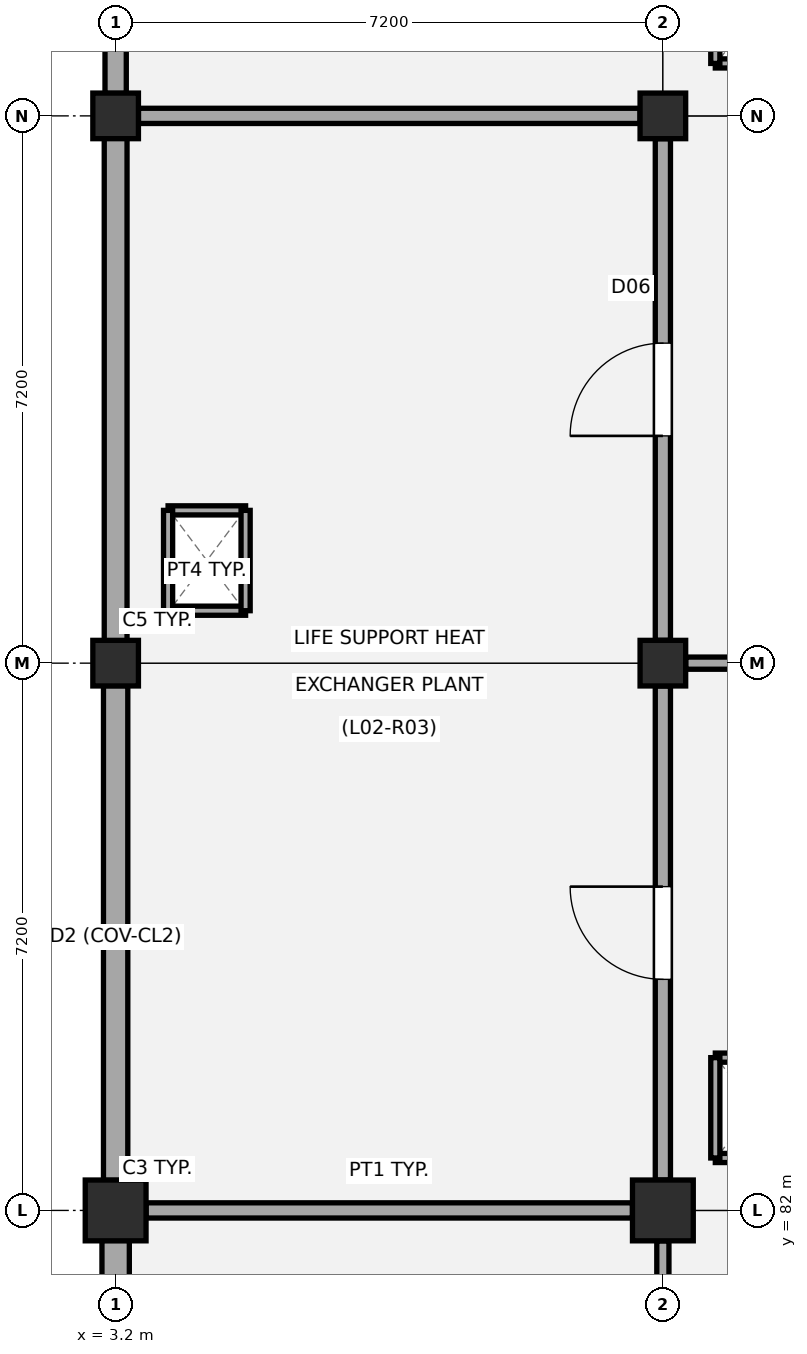
"""IFC4 building model, lengths in metres.
Left out: names, types, materials, properties, quantities, classifications, styles, units other than length and angle.
Written with IfcOpenShell. Run it as: python <this file> out.ifc"""

import sys

from ifc_helpers import new_model, si_unit, direction, frame, frame_2d, origin, origin_2d, place, context, subcontext, project, spatial, rectangle, extrude, element, fill, save


model = new_model("IFC4")
c1 = context("Model", 3, precision=1e-05, world=origin(), true_north=direction((0.0, 1.0)))
c2 = subcontext(c1, "Body", "Model", "MODEL_VIEW")
j1 = project(units=[si_unit("LENGTHUNIT", "METRE"), si_unit("PLANEANGLEUNIT", "RADIAN")], contexts=[c1])
p1 = place(None, origin())
s1 = spatial("IfcSite", under=j1, at=p1, CompositionType="ELEMENT")
p2 = place(p1, origin())
s2 = spatial("IfcBuilding", under=s1, at=p2, CompositionType="ELEMENT")
p3 = place(p2, frame((0.0, 0.0, 9.18)))
s3 = spatial("IfcBuildingStorey", under=s2, at=p3, CompositionType="ELEMENT", Elevation=9.18)
p4 = place(p3, frame((3.2, 82.0, 0.0), z_axis=(0.0, 0.0, 1.0), x_axis=(1.0, 0.0, 0.0)))
e1 = element("IfcColumn", 1, at=p4, inside=s3, PredefinedType="COLUMN", context=c2, shape_type="SweptSolid", body=[
    extrude(rectangle(XDim=0.8, YDim=0.8, at=origin_2d()), origin(), (0.0, 0.0, 1.0), 4.32),
])
for number, where, z_axis, x_axis in (
    (2, (3.2, 89.2, 0.0), (0.0, 0.0, 1.0), (1.0, 0.0, 0.0)),
    (3, (3.2, 96.4, 0.0), (0.0, 0.0, 1.0), (1.0, 0.0, 0.0)),
):
    element("IfcColumn", number, at=place(p3, frame(where, z_axis=z_axis, x_axis=x_axis)), inside=s3, PredefinedType="COLUMN", context=c2, shape_type="SweptSolid", body=[
        extrude(rectangle(XDim=0.6, YDim=0.6, at=origin_2d()), origin(), (0.0, 0.0, 1.0), 4.32),
    ])
p5 = place(p3, frame((10.4, 82.0, 0.0), z_axis=(0.0, 0.0, 1.0), x_axis=(1.0, 0.0, 0.0)))
e4 = element("IfcColumn", 4, at=p5, inside=s3, PredefinedType="COLUMN", context=c2, shape_type="SweptSolid", body=[
    extrude(rectangle(XDim=0.8, YDim=0.8, at=origin_2d()), origin(), (0.0, 0.0, 1.0), 4.32),
])
for number, where, z_axis, x_axis in (
    (5, (10.4, 89.2, 0.0), (0.0, 0.0, 1.0), (1.0, 0.0, 0.0)),
    (6, (10.4, 96.4, 0.0), (0.0, 0.0, 1.0), (1.0, 0.0, 0.0)),
):
    element("IfcColumn", number, at=place(p3, frame(where, z_axis=z_axis, x_axis=x_axis)), inside=s3, PredefinedType="COLUMN", context=c2, shape_type="SweptSolid", body=[
        extrude(rectangle(XDim=0.6, YDim=0.6, at=origin_2d()), origin(), (0.0, 0.0, 1.0), 4.32),
    ])
p6 = place(p3, frame((3.2, 75.195, 0.0), z_axis=(0.0, 0.0, 1.0), x_axis=(0.0, 1.0, 0.0)))
e7 = element("IfcWall", 7, at=p6, inside=s3, PredefinedType="STANDARD", context=c2, shape_type="SweptSolid", body=[
    extrude(rectangle(XDim=6.41, YDim=0.36, at=frame_2d((3.205, 0.0))), origin(), (0.0, 0.0, 1.0), 3.46),
])
p7 = place(p6, frame((2.08, 0.0, 0.95)))
e8 = element("IfcOpeningElement", 8, at=p7, cuts=e7, PredefinedType="OPENING", context=c2, shape_type="SweptSolid", body=[
    extrude(rectangle(XDim=2.25, YDim=1.8, at=frame_2d((1.125, 0.9))), frame((0.0, 0.19, 0.0), z_axis=(0.0, -1.0, 0.0), x_axis=(1.0, 0.0, 0.0)), (0.0, 0.0, 1.0), 0.38),
])
p8 = place(p3, frame((3.2, 82.395, 0.0), z_axis=(0.0, 0.0, 1.0), x_axis=(0.0, 1.0, 0.0)))
e9 = element("IfcWall", 9, at=p8, inside=s3, PredefinedType="STANDARD", context=c2, shape_type="SweptSolid", body=[
    extrude(rectangle(XDim=6.51, YDim=0.32, at=frame_2d((3.255, 0.0))), origin(), (0.0, 0.0, 1.0), 3.48),
])
p9 = place(p3, frame((3.2, 89.495, 0.0), z_axis=(0.0, 0.0, 1.0), x_axis=(0.0, 1.0, 0.0)))
e10 = element("IfcWall", 10, at=p9, inside=s3, PredefinedType="STANDARD", context=c2, shape_type="SweptSolid", body=[
    extrude(rectangle(XDim=6.61, YDim=0.3, at=frame_2d((3.305, 0.0))), origin(), (0.0, 0.0, 1.0), 3.48),
])
p10 = place(p3, frame((3.2, 96.695, 0.0), z_axis=(0.0, 0.0, 1.0), x_axis=(0.0, 1.0, 0.0)))
e11 = element("IfcWall", 11, at=p10, inside=s3, PredefinedType="STANDARD", context=c2, shape_type="SweptSolid", body=[
    extrude(rectangle(XDim=6.61, YDim=0.28, at=frame_2d((3.305, 0.0))), origin(), (0.0, 0.0, 1.0), 3.48),
])
for number, where, z_axis, x_axis in (
    (12, (3.89, 89.89, 0.0), (0.0, 0.0, 1.0), (1.0, 0.0, 0.0)),
    (13, (3.89, 91.21, 0.0), (0.0, 0.0, 1.0), (1.0, 0.0, 0.0)),
):
    element("IfcWall", number, at=place(p3, frame(where, z_axis=z_axis, x_axis=x_axis)), inside=s3, PredefinedType="PARTITIONING", context=c2, shape_type="SweptSolid", body=[
        extrude(rectangle(XDim=1.02, YDim=0.12, at=frame_2d((0.51, 0.0))), origin(), (0.0, 0.0, 1.0), 4.02),
    ])
for number, where, z_axis, x_axis in (
    (14, (3.89, 89.89, 0.0), (0.0, 0.0, 1.0), (0.0, 1.0, 0.0)),
    (15, (4.91, 89.89, 0.0), (0.0, 0.0, 1.0), (0.0, 1.0, 0.0)),
):
    element("IfcWall", number, at=place(p3, frame(where, z_axis=z_axis, x_axis=x_axis)), inside=s3, PredefinedType="PARTITIONING", context=c2, shape_type="SweptSolid", body=[
        extrude(rectangle(XDim=1.32, YDim=0.12, at=frame_2d((0.66, 0.0))), origin(), (0.0, 0.0, 1.0), 4.02),
    ])
for number, where, z_axis, x_axis in (
    (16, (11.09, 82.69, 0.0), (0.0, 0.0, 1.0), (1.0, 0.0, 0.0)),
    (17, (11.09, 84.01, 0.0), (0.0, 0.0, 1.0), (1.0, 0.0, 0.0)),
):
    element("IfcWall", number, at=place(p3, frame(where, z_axis=z_axis, x_axis=x_axis)), inside=s3, PredefinedType="PARTITIONING", context=c2, shape_type="SweptSolid", body=[
        extrude(rectangle(XDim=1.02, YDim=0.12, at=frame_2d((0.51, 0.0))), origin(), (0.0, 0.0, 1.0), 4.02),
    ])
p11 = place(p3, frame((11.09, 82.69, 0.0), z_axis=(0.0, 0.0, 1.0), x_axis=(0.0, 1.0, 0.0)))
e18 = element("IfcWall", 18, at=p11, inside=s3, PredefinedType="PARTITIONING", context=c2, shape_type="SweptSolid", body=[
    extrude(rectangle(XDim=1.32, YDim=0.12, at=frame_2d((0.66, 0.0))), origin(), (0.0, 0.0, 1.0), 4.02),
])
p12 = place(p3, frame((11.09, 97.09, 0.0), z_axis=(0.0, 0.0, 1.0), x_axis=(1.0, 0.0, 0.0)))
e19 = element("IfcWall", 19, at=p12, inside=s3, PredefinedType="PARTITIONING", context=c2, shape_type="SweptSolid", body=[
    extrude(rectangle(XDim=1.02, YDim=0.12, at=frame_2d((0.51, 0.0))), origin(), (0.0, 0.0, 1.0), 4.02),
])
p13 = place(p3, frame((11.09, 97.09, 0.0), z_axis=(0.0, 0.0, 1.0), x_axis=(0.0, 1.0, 0.0)))
e20 = element("IfcWall", 20, at=p13, inside=s3, PredefinedType="PARTITIONING", context=c2, shape_type="SweptSolid", body=[
    extrude(rectangle(XDim=1.32, YDim=0.12, at=frame_2d((0.66, 0.0))), origin(), (0.0, 0.0, 1.0), 4.02),
])
p14 = place(p3, frame((10.4, 75.2, 0.0), z_axis=(0.0, 0.0, 1.0), x_axis=(0.0, 1.0, 0.0)))
e21 = element("IfcWall", 21, at=p14, inside=s3, PredefinedType="PARTITIONING", context=c2, shape_type="SweptSolid", body=[
    extrude(rectangle(XDim=6.4, YDim=0.16, at=frame_2d((3.2, 0.0))), origin(), (0.0, 0.0, 1.0), 3.36),
])
p15 = place(p14, frame((2.48, 0.0, 0.0)))
e22 = element("IfcOpeningElement", 22, at=p15, cuts=e21, PredefinedType="OPENING", context=c2, shape_type="SweptSolid", body=[
    extrude(rectangle(XDim=1.44, YDim=2.2, at=frame_2d((0.72, 1.1))), frame((0.0, 0.09, 0.0), z_axis=(0.0, -1.0, 0.0), x_axis=(1.0, 0.0, 0.0)), (0.0, 0.0, 1.0), 0.18),
])
p16 = place(p3, frame((3.6, 82.0, 0.0), z_axis=(0.0, 0.0, 1.0), x_axis=(1.0, 0.0, 0.0)))
e23 = element("IfcWall", 23, at=p16, inside=s3, PredefinedType="PARTITIONING", context=c2, shape_type="SweptSolid", body=[
    extrude(rectangle(XDim=6.4, YDim=0.2, at=frame_2d((3.2, 0.0))), origin(), (0.0, 0.0, 1.0), 3.41),
])
p17 = place(p3, frame((10.4, 82.4, 0.0), z_axis=(0.0, 0.0, 1.0), x_axis=(0.0, 1.0, 0.0)))
e24 = element("IfcWall", 24, at=p17, inside=s3, PredefinedType="PARTITIONING", context=c2, shape_type="SweptSolid", body=[
    extrude(rectangle(XDim=6.5, YDim=0.2, at=frame_2d((3.25, 0.0))), origin(), (0.0, 0.0, 1.0), 3.43),
])
p18 = place(p17, frame((2.64, 0.0, 0.0)))
e25 = element("IfcOpeningElement", 25, at=p18, cuts=e24, PredefinedType="OPENING", context=c2, shape_type="SweptSolid", body=[
    extrude(rectangle(XDim=1.22, YDim=2.16, at=frame_2d((0.61, 1.08))), frame((0.0, 0.11, 0.0), z_axis=(0.0, -1.0, 0.0), x_axis=(1.0, 0.0, 0.0)), (0.0, 0.0, 1.0), 0.22),
])
p19 = place(p3, frame((10.4, 89.5, 0.0), z_axis=(0.0, 0.0, 1.0), x_axis=(0.0, 1.0, 0.0)))
e26 = element("IfcWall", 26, at=p19, inside=s3, PredefinedType="PARTITIONING", context=c2, shape_type="SweptSolid", body=[
    extrude(rectangle(XDim=6.6, YDim=0.2, at=frame_2d((3.3, 0.0))), origin(), (0.0, 0.0, 1.0), 3.38),
])
p20 = place(p19, frame((2.69, 0.0, 0.0)))
e27 = element("IfcOpeningElement", 27, at=p20, cuts=e26, PredefinedType="OPENING", context=c2, shape_type="SweptSolid", body=[
    extrude(rectangle(XDim=1.22, YDim=2.16, at=frame_2d((0.61, 1.08))), frame((0.0, 0.11, 0.0), z_axis=(0.0, -1.0, 0.0), x_axis=(1.0, 0.0, 0.0)), (0.0, 0.0, 1.0), 0.22),
])
p21 = place(p3, frame((3.5, 96.4, 0.0), z_axis=(0.0, 0.0, 1.0), x_axis=(1.0, 0.0, 0.0)))
e28 = element("IfcWall", 28, at=p21, inside=s3, PredefinedType="PARTITIONING", context=c2, shape_type="SweptSolid", body=[
    extrude(rectangle(XDim=6.6, YDim=0.2, at=frame_2d((3.3, 0.0))), origin(), (0.0, 0.0, 1.0), 3.43),
])
p22 = place(p3, frame((10.7, 89.2, 0.0), z_axis=(0.0, 0.0, 1.0), x_axis=(1.0, 0.0, 0.0)))
e29 = element("IfcWall", 29, at=p22, inside=s3, PredefinedType="PARTITIONING", context=c2, shape_type="SweptSolid", body=[
    extrude(rectangle(XDim=6.6, YDim=0.16, at=frame_2d((3.3, 0.0))), origin(), (0.0, 0.0, 1.0), 3.43),
])
p23 = place(p22, frame((2.37, 0.0, 0.0)))
e30 = element("IfcOpeningElement", 30, at=p23, cuts=e29, PredefinedType="OPENING", context=c2, shape_type="SweptSolid", body=[
    extrude(rectangle(XDim=1.86, YDim=2.26, at=frame_2d((0.93, 1.13))), frame((0.0, 0.09, 0.0), z_axis=(0.0, -1.0, 0.0), x_axis=(1.0, 0.0, 0.0)), (0.0, 0.0, 1.0), 0.18),
])
p24 = place(p20, origin())
e31 = element("IfcDoor", 31, at=p24, inside=s3, OperationType="SINGLE_SWING_LEFT", PredefinedType="DOOR", context=c2, shape_type="SweptSolid", body=[
    extrude(rectangle(XDim=1.22, YDim=2.16, at=frame_2d((0.61, 1.08))), frame((0.0, 0.025, 0.0), z_axis=(0.0, -1.0, 0.0), x_axis=(1.0, 0.0, 0.0)), (0.0, 0.0, 1.0), 0.05),
])
fill(e27, e31)
p25 = place(p18, origin())
e32 = element("IfcDoor", 32, at=p25, inside=s3, OperationType="SINGLE_SWING_RIGHT", PredefinedType="DOOR", context=c2, shape_type="SweptSolid", body=[
    extrude(rectangle(XDim=1.22, YDim=2.16, at=frame_2d((0.61, 1.08))), frame((0.0, 0.025, 0.0), z_axis=(0.0, -1.0, 0.0), x_axis=(1.0, 0.0, 0.0)), (0.0, 0.0, 1.0), 0.05),
])
fill(e25, e32)
save(model, sys.argv[1])
